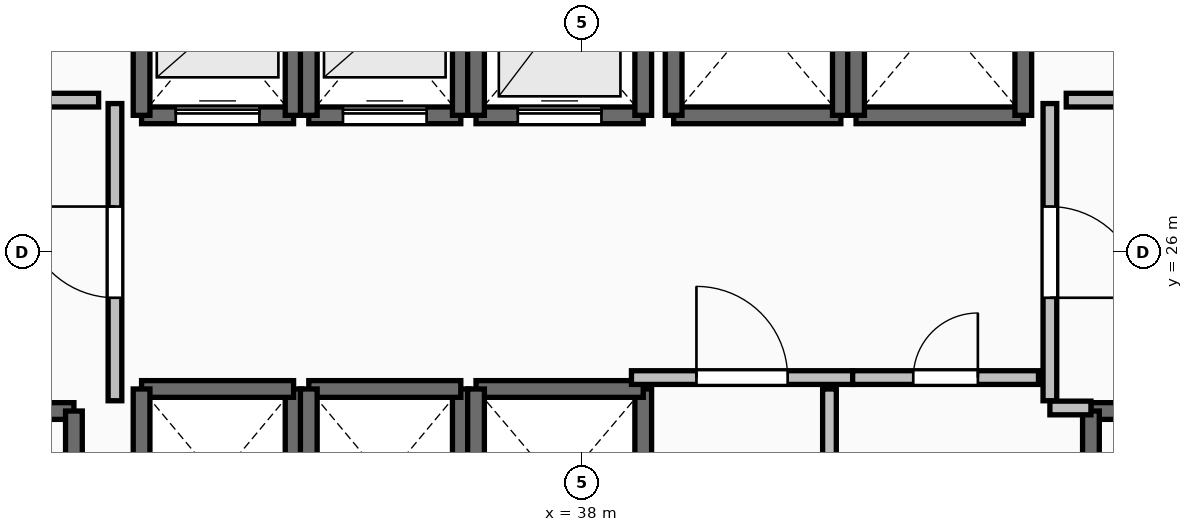
"""IFC4 building model, lengths in metres.
Left out: names, types, materials, properties, quantities, classifications, styles, units other than length and angle.
Written with IfcOpenShell. Run it as: python <this file> out.ifc"""

import sys

from ifc_helpers import new_model, si_unit, direction, frame, frame_2d, origin, place, context, subcontext, project, spatial, rectangle, extrude, element, fill, save


model = new_model("IFC4")
c1 = context("Model", 3, precision=1e-05, world=origin(), true_north=direction((0.0, 1.0)))
c2 = subcontext(c1, "Body", "Model", "MODEL_VIEW")
j1 = project(units=[si_unit("LENGTHUNIT", "METRE"), si_unit("PLANEANGLEUNIT", "RADIAN")], contexts=[c1])
p1 = place(None, origin())
s1 = spatial("IfcSite", under=j1, at=p1, CompositionType="ELEMENT")
p2 = place(p1, origin())
s2 = spatial("IfcBuilding", under=s1, at=p2, CompositionType="ELEMENT")
p3 = place(p2, frame((0.0, 0.0, 34.5)))
s3 = spatial("IfcBuildingStorey", under=s2, at=p3, CompositionType="ELEMENT", Elevation=34.5)
p4 = place(p3, frame((27.94, 23.91, 0.0), z_axis=(0.0, 0.0, 1.0), x_axis=(1.0, 0.0, 0.0)))
e1 = element("IfcWall", 1, at=p4, inside=s3, PredefinedType="SOLIDWALL", context=c2, shape_type="SweptSolid", body=[
    extrude(rectangle(XDim=3.37, YDim=0.22, at=frame_2d((1.685, 0.0))), origin(), (0.0, 0.0, 1.0), 3.24),
])
p5 = place(p4, frame((1.135, 0.0, 0.0)))
e2 = element("IfcOpeningElement", 2, at=p5, cuts=e1, PredefinedType="OPENING", context=c2, shape_type="SweptSolid", body=[
    extrude(rectangle(XDim=1.1, YDim=2.15, at=frame_2d((0.55, 1.075))), frame((0.0, 0.125, 0.0), z_axis=(0.0, -1.0, 0.0), x_axis=(1.0, 0.0, 0.0)), (0.0, 0.0, 1.0), 0.25),
])
p6 = place(p3, frame((31.31, 23.91, 0.0), z_axis=(0.0, 0.0, 1.0), x_axis=(0.0, -1.0, 0.0)))
e3 = element("IfcWall", 3, at=p6, inside=s3, PredefinedType="SOLIDWALL", context=c2, shape_type="SweptSolid", body=[
    extrude(rectangle(XDim=7.42, YDim=0.22, at=frame_2d((3.71, 0.0))), origin(), (0.0, 0.0, 1.0), 3.24),
])
p7 = place(p3, frame((44.69, 23.91, 0.0), z_axis=(0.0, 0.0, 1.0), x_axis=(1.0, 0.0, 0.0)))
e4 = element("IfcWall", 4, at=p7, inside=s3, PredefinedType="SOLIDWALL", context=c2, shape_type="SweptSolid", body=[
    extrude(rectangle(XDim=3.37, YDim=0.22, at=frame_2d((1.685, 0.0))), origin(), (0.0, 0.0, 1.0), 3.24),
])
p8 = place(p7, frame((1.135, 0.0, 0.0)))
e5 = element("IfcOpeningElement", 5, at=p8, cuts=e4, PredefinedType="OPENING", context=c2, shape_type="SweptSolid", body=[
    extrude(rectangle(XDim=1.1, YDim=2.15, at=frame_2d((0.55, 1.075))), frame((0.0, 0.125, 0.0), z_axis=(0.0, -1.0, 0.0), x_axis=(1.0, 0.0, 0.0)), (0.0, 0.0, 1.0), 0.25),
])
p9 = place(p3, frame((44.69, 16.49, 0.0), z_axis=(0.0, 0.0, 1.0), x_axis=(0.0, 1.0, 0.0)))
e6 = element("IfcWall", 6, at=p9, inside=s3, PredefinedType="SOLIDWALL", context=c2, shape_type="SweptSolid", body=[
    extrude(rectangle(XDim=7.42, YDim=0.22, at=frame_2d((3.71, 0.0))), origin(), (0.0, 0.0, 1.0), 3.24),
])
p10 = place(p3, frame((32.2, 27.8, 0.0), z_axis=(0.0, 0.0, 1.0), x_axis=(1.0, 0.0, 0.0)))
e7 = element("IfcWall", 7, at=p10, inside=s3, PredefinedType="SOLIDWALL", context=c2, shape_type="SweptSolid", body=[
    extrude(rectangle(XDim=2.0, YDim=0.22, at=frame_2d((1.0, 0.0))), origin(), (0.0, 0.0, 1.0), 3.24),
])
p11 = place(p10, frame((0.45, 0.0, 0.0)))
e8 = element("IfcOpeningElement", 8, at=p11, cuts=e7, PredefinedType="OPENING", context=c2, shape_type="SweptSolid", body=[
    extrude(rectangle(XDim=1.1, YDim=2.2, at=frame_2d((0.55, 1.1))), frame((0.0, 0.125, 0.0), z_axis=(0.0, -1.0, 0.0), x_axis=(1.0, 0.0, 0.0)), (0.0, 0.0, 1.0), 0.25),
])
for number, where, z_axis, x_axis in (
    (9, (34.2, 27.8, 0.0), (0.0, 0.0, 1.0), (0.0, 1.0, 0.0)),
    (10, (32.2, 30.2, 0.0), (0.0, 0.0, 1.0), (0.0, -1.0, 0.0)),
):
    element("IfcWall", number, at=place(p3, frame(where, z_axis=z_axis, x_axis=x_axis)), inside=s3, PredefinedType="SOLIDWALL", context=c2, shape_type="SweptSolid", body=[
        extrude(rectangle(XDim=2.4, YDim=0.22, at=frame_2d((1.2, 0.0))), origin(), (0.0, 0.0, 1.0), 3.24),
    ])
p12 = place(p3, frame((34.4, 27.8, 0.0), z_axis=(0.0, 0.0, 1.0), x_axis=(1.0, 0.0, 0.0)))
e11 = element("IfcWall", 11, at=p12, inside=s3, PredefinedType="SOLIDWALL", context=c2, shape_type="SweptSolid", body=[
    extrude(rectangle(XDim=2.0, YDim=0.22, at=frame_2d((1.0, 0.0))), origin(), (0.0, 0.0, 1.0), 3.24),
])
p13 = place(p12, frame((0.45, 0.0, 0.0)))
e12 = element("IfcOpeningElement", 12, at=p13, cuts=e11, PredefinedType="OPENING", context=c2, shape_type="SweptSolid", body=[
    extrude(rectangle(XDim=1.1, YDim=2.2, at=frame_2d((0.55, 1.1))), frame((0.0, 0.125, 0.0), z_axis=(0.0, -1.0, 0.0), x_axis=(1.0, 0.0, 0.0)), (0.0, 0.0, 1.0), 0.25),
])
for number, where, z_axis, x_axis in (
    (13, (36.4, 27.8, 0.0), (0.0, 0.0, 1.0), (0.0, 1.0, 0.0)),
    (14, (34.4, 30.2, 0.0), (0.0, 0.0, 1.0), (0.0, -1.0, 0.0)),
):
    element("IfcWall", number, at=place(p3, frame(where, z_axis=z_axis, x_axis=x_axis)), inside=s3, PredefinedType="SOLIDWALL", context=c2, shape_type="SweptSolid", body=[
        extrude(rectangle(XDim=2.4, YDim=0.22, at=frame_2d((1.2, 0.0))), origin(), (0.0, 0.0, 1.0), 3.24),
    ])
p14 = place(p3, frame((36.6, 27.8, 0.0), z_axis=(0.0, 0.0, 1.0), x_axis=(1.0, 0.0, 0.0)))
e15 = element("IfcWall", 15, at=p14, inside=s3, PredefinedType="SOLIDWALL", context=c2, shape_type="SweptSolid", body=[
    extrude(rectangle(XDim=2.2, YDim=0.22, at=frame_2d((1.1, 0.0))), origin(), (0.0, 0.0, 1.0), 3.24),
])
p15 = place(p14, frame((0.55, 0.0, 0.0)))
e16 = element("IfcOpeningElement", 16, at=p15, cuts=e15, PredefinedType="OPENING", context=c2, shape_type="SweptSolid", body=[
    extrude(rectangle(XDim=1.1, YDim=2.2, at=frame_2d((0.55, 1.1))), frame((0.0, 0.125, 0.0), z_axis=(0.0, -1.0, 0.0), x_axis=(1.0, 0.0, 0.0)), (0.0, 0.0, 1.0), 0.25),
])
for number, where, z_axis, x_axis in (
    (17, (38.8, 27.8, 0.0), (0.0, 0.0, 1.0), (0.0, 1.0, 0.0)),
    (18, (36.6, 30.4, 0.0), (0.0, 0.0, 1.0), (0.0, -1.0, 0.0)),
):
    element("IfcWall", number, at=place(p3, frame(where, z_axis=z_axis, x_axis=x_axis)), inside=s3, PredefinedType="SOLIDWALL", context=c2, shape_type="SweptSolid", body=[
        extrude(rectangle(XDim=2.6, YDim=0.22, at=frame_2d((1.3, 0.0))), origin(), (0.0, 0.0, 1.0), 3.24),
    ])
p16 = place(p3, frame((34.2, 21.8, 0.0), z_axis=(0.0, 0.0, 1.0), x_axis=(0.0, 1.0, 0.0)))
e19 = element("IfcWall", 19, at=p16, inside=s3, PredefinedType="SOLIDWALL", context=c2, shape_type="SweptSolid", body=[
    extrude(rectangle(XDim=2.4, YDim=0.22, at=frame_2d((1.2, 0.0))), origin(), (0.0, 0.0, 1.0), 3.24),
])
p17 = place(p3, frame((34.2, 24.2, 0.0), z_axis=(0.0, 0.0, 1.0), x_axis=(-1.0, 0.0, 0.0)))
e20 = element("IfcWall", 20, at=p17, inside=s3, PredefinedType="SOLIDWALL", context=c2, shape_type="SweptSolid", body=[
    extrude(rectangle(XDim=2.0, YDim=0.22, at=frame_2d((1.0, 0.0))), origin(), (0.0, 0.0, 1.0), 3.24),
])
for number, where, z_axis, x_axis in (
    (21, (32.2, 24.2, 0.0), (0.0, 0.0, 1.0), (0.0, -1.0, 0.0)),
    (22, (36.4, 21.8, 0.0), (0.0, 0.0, 1.0), (0.0, 1.0, 0.0)),
):
    element("IfcWall", number, at=place(p3, frame(where, z_axis=z_axis, x_axis=x_axis)), inside=s3, PredefinedType="SOLIDWALL", context=c2, shape_type="SweptSolid", body=[
        extrude(rectangle(XDim=2.4, YDim=0.22, at=frame_2d((1.2, 0.0))), origin(), (0.0, 0.0, 1.0), 3.24),
    ])
p18 = place(p3, frame((36.4, 24.2, 0.0), z_axis=(0.0, 0.0, 1.0), x_axis=(-1.0, 0.0, 0.0)))
e23 = element("IfcWall", 23, at=p18, inside=s3, PredefinedType="SOLIDWALL", context=c2, shape_type="SweptSolid", body=[
    extrude(rectangle(XDim=2.0, YDim=0.22, at=frame_2d((1.0, 0.0))), origin(), (0.0, 0.0, 1.0), 3.24),
])
p19 = place(p3, frame((34.4, 24.2, 0.0), z_axis=(0.0, 0.0, 1.0), x_axis=(0.0, -1.0, 0.0)))
e24 = element("IfcWall", 24, at=p19, inside=s3, PredefinedType="SOLIDWALL", context=c2, shape_type="SweptSolid", body=[
    extrude(rectangle(XDim=2.4, YDim=0.22, at=frame_2d((1.2, 0.0))), origin(), (0.0, 0.0, 1.0), 3.24),
])
p20 = place(p3, frame((38.8, 21.6, 0.0), z_axis=(0.0, 0.0, 1.0), x_axis=(0.0, 1.0, 0.0)))
e25 = element("IfcWall", 25, at=p20, inside=s3, PredefinedType="SOLIDWALL", context=c2, shape_type="SweptSolid", body=[
    extrude(rectangle(XDim=2.6, YDim=0.22, at=frame_2d((1.3, 0.0))), origin(), (0.0, 0.0, 1.0), 3.24),
])
p21 = place(p3, frame((38.8, 24.2, 0.0), z_axis=(0.0, 0.0, 1.0), x_axis=(-1.0, 0.0, 0.0)))
e26 = element("IfcWall", 26, at=p21, inside=s3, PredefinedType="SOLIDWALL", context=c2, shape_type="SweptSolid", body=[
    extrude(rectangle(XDim=2.2, YDim=0.22, at=frame_2d((1.1, 0.0))), origin(), (0.0, 0.0, 1.0), 3.24),
])
p22 = place(p3, frame((36.6, 24.2, 0.0), z_axis=(0.0, 0.0, 1.0), x_axis=(0.0, -1.0, 0.0)))
e27 = element("IfcWall", 27, at=p22, inside=s3, PredefinedType="SOLIDWALL", context=c2, shape_type="SweptSolid", body=[
    extrude(rectangle(XDim=2.6, YDim=0.22, at=frame_2d((1.3, 0.0))), origin(), (0.0, 0.0, 1.0), 3.24),
])
p23 = place(p3, frame((39.2, 27.8, 0.0), z_axis=(0.0, 0.0, 1.0), x_axis=(1.0, 0.0, 0.0)))
e28 = element("IfcWall", 28, at=p23, inside=s3, PredefinedType="SOLIDWALL", context=c2, shape_type="SweptSolid", body=[
    extrude(rectangle(XDim=2.2, YDim=0.22, at=frame_2d((1.1, 0.0))), origin(), (0.0, 0.0, 1.0), 3.24),
])
for number, where, z_axis, x_axis in (
    (29, (41.4, 27.8, 0.0), (0.0, 0.0, 1.0), (0.0, 1.0, 0.0)),
    (30, (39.2, 30.4, 0.0), (0.0, 0.0, 1.0), (0.0, -1.0, 0.0)),
):
    element("IfcWall", number, at=place(p3, frame(where, z_axis=z_axis, x_axis=x_axis)), inside=s3, PredefinedType="SOLIDWALL", context=c2, shape_type="SweptSolid", body=[
        extrude(rectangle(XDim=2.6, YDim=0.22, at=frame_2d((1.3, 0.0))), origin(), (0.0, 0.0, 1.0), 3.24),
    ])
p24 = place(p3, frame((41.6, 27.8, 0.0), z_axis=(0.0, 0.0, 1.0), x_axis=(1.0, 0.0, 0.0)))
e31 = element("IfcWall", 31, at=p24, inside=s3, PredefinedType="SOLIDWALL", context=c2, shape_type="SweptSolid", body=[
    extrude(rectangle(XDim=2.2, YDim=0.22, at=frame_2d((1.1, 0.0))), origin(), (0.0, 0.0, 1.0), 3.24),
])
for number, where, z_axis, x_axis in (
    (32, (43.8, 27.8, 0.0), (0.0, 0.0, 1.0), (0.0, 1.0, 0.0)),
    (33, (41.6, 30.4, 0.0), (0.0, 0.0, 1.0), (0.0, -1.0, 0.0)),
):
    element("IfcWall", number, at=place(p3, frame(where, z_axis=z_axis, x_axis=x_axis)), inside=s3, PredefinedType="SOLIDWALL", context=c2, shape_type="SweptSolid", body=[
        extrude(rectangle(XDim=2.6, YDim=0.22, at=frame_2d((1.3, 0.0))), origin(), (0.0, 0.0, 1.0), 3.24),
    ])
p25 = place(p3, frame((31.85, 24.045, 0.0), z_axis=(0.0, 0.0, 1.0), x_axis=(0.0, 1.0, 0.0)))
e34 = element("IfcWall", 34, at=p25, inside=s3, PredefinedType="PARTITIONING", context=c2, shape_type="SweptSolid", body=[
    extrude(rectangle(XDim=3.91, YDim=0.18, at=frame_2d((1.955, 0.0))), origin(), (0.0, 0.0, 1.0), 3.24),
])
p26 = place(p25, frame((1.355, 0.0, 0.0)))
e35 = element("IfcOpeningElement", 35, at=p26, cuts=e34, PredefinedType="OPENING", context=c2, shape_type="SweptSolid", body=[
    extrude(rectangle(XDim=1.2, YDim=2.15, at=frame_2d((0.6, 1.075))), frame((0.0, 0.105, 0.0), z_axis=(0.0, -1.0, 0.0), x_axis=(1.0, 0.0, 0.0)), (0.0, 0.0, 1.0), 0.21),
])
p27 = place(p3, frame((44.15, 27.955, 0.0), z_axis=(0.0, 0.0, 1.0), x_axis=(0.0, -1.0, 0.0)))
e36 = element("IfcWall", 36, at=p27, inside=s3, PredefinedType="PARTITIONING", context=c2, shape_type="SweptSolid", body=[
    extrude(rectangle(XDim=3.91, YDim=0.18, at=frame_2d((1.955, 0.0))), origin(), (0.0, 0.0, 1.0), 3.24),
])
p28 = place(p27, frame((1.355, 0.0, 0.0)))
e37 = element("IfcOpeningElement", 37, at=p28, cuts=e36, PredefinedType="OPENING", context=c2, shape_type="SweptSolid", body=[
    extrude(rectangle(XDim=1.2, YDim=2.15, at=frame_2d((0.6, 1.075))), frame((0.0, 0.105, 0.0), z_axis=(0.0, -1.0, 0.0), x_axis=(1.0, 0.0, 0.0)), (0.0, 0.0, 1.0), 0.21),
])
p29 = place(p3, frame((44.15, 23.95, 0.0), z_axis=(0.0, 0.0, 1.0), x_axis=(1.0, 0.0, 0.0)))
e38 = element("IfcWall", 38, at=p29, inside=s3, PredefinedType="PARTITIONING", context=c2, shape_type="SweptSolid", body=[
    extrude(rectangle(XDim=0.54, YDim=0.18, at=frame_2d((0.27, 0.0))), origin(), (0.0, 0.0, 1.0), 3.24),
])
p30 = place(p3, frame((38.645, 24.35, 0.0), z_axis=(0.0, 0.0, 1.0), x_axis=(1.0, 0.0, 0.0)))
e39 = element("IfcWall", 39, at=p30, inside=s3, PredefinedType="PARTITIONING", context=c2, shape_type="SweptSolid", body=[
    extrude(rectangle(XDim=2.91, YDim=0.18, at=frame_2d((1.455, 0.0))), origin(), (0.0, 0.0, 1.0), 3.24),
])
p31 = place(p30, frame((0.855, 0.0, 0.0)))
e40 = element("IfcOpeningElement", 40, at=p31, cuts=e39, PredefinedType="OPENING", context=c2, shape_type="SweptSolid", body=[
    extrude(rectangle(XDim=1.2, YDim=2.15, at=frame_2d((0.6, 1.075))), frame((0.0, 0.105, 0.0), z_axis=(0.0, -1.0, 0.0), x_axis=(1.0, 0.0, 0.0)), (0.0, 0.0, 1.0), 0.21),
])
p32 = place(p3, frame((41.555, 24.35, 0.0), z_axis=(0.0, 0.0, 1.0), x_axis=(1.0, 0.0, 0.0)))
e41 = element("IfcWall", 41, at=p32, inside=s3, PredefinedType="PARTITIONING", context=c2, shape_type="SweptSolid", body=[
    extrude(rectangle(XDim=2.445, YDim=0.18, at=frame_2d((1.223, 0.0))), origin(), (0.0, 0.0, 1.0), 3.24),
])
p33 = place(p32, frame((0.798, 0.0, 0.0)))
e42 = element("IfcOpeningElement", 42, at=p33, cuts=e41, PredefinedType="OPENING", context=c2, shape_type="SweptSolid", body=[
    extrude(rectangle(XDim=0.85, YDim=2.1, at=frame_2d((0.425, 1.05))), frame((0.0, 0.105, 0.0), z_axis=(0.0, -1.0, 0.0), x_axis=(1.0, 0.0, 0.0)), (0.0, 0.0, 1.0), 0.21),
])
p34 = place(p3, frame((41.25, 20.305, 0.0), z_axis=(0.0, 0.0, 1.0), x_axis=(0.0, 1.0, 0.0)))
e43 = element("IfcWall", 43, at=p34, inside=s3, PredefinedType="PARTITIONING", context=c2, shape_type="SweptSolid", body=[
    extrude(rectangle(XDim=3.895, YDim=0.18, at=frame_2d((1.948, 0.0))), origin(), (0.0, 0.0, 1.0), 3.24),
])
p35 = place(p34, frame((1.522, 0.0, 0.0)))
e44 = element("IfcOpeningElement", 44, at=p35, cuts=e43, PredefinedType="OPENING", context=c2, shape_type="SweptSolid", body=[
    extrude(rectangle(XDim=0.85, YDim=2.1, at=frame_2d((0.425, 1.05))), frame((0.0, 0.105, 0.0), z_axis=(0.0, -1.0, 0.0), x_axis=(1.0, 0.0, 0.0)), (0.0, 0.0, 1.0), 0.21),
])
for number, where, z_axis, x_axis in (
    (45, (31.635, 28.0, 0.0), (0.0, 0.0, 1.0), (-1.0, 0.0, 0.0)),
    (46, (45.28, 28.0, 0.0), (0.0, 0.0, 1.0), (-1.0, 0.0, 0.0)),
):
    element("IfcWall", number, at=place(p3, frame(where, z_axis=z_axis, x_axis=x_axis)), inside=s3, PredefinedType="PARTITIONING", context=c2, shape_type="SweptSolid", body=[
        extrude(rectangle(XDim=0.915, YDim=0.18, at=frame_2d((0.458, 0.0))), origin(), (0.0, 0.0, 1.0), 3.24),
    ])
p36 = place(p11, origin())
e47 = element("IfcDoor", 47, at=p36, inside=s3, OperationType="SLIDING_TO_LEFT", PredefinedType="DOOR", context=c2, shape_type="SweptSolid", body=[
    extrude(rectangle(XDim=1.1, YDim=2.2, at=frame_2d((0.55, 1.1))), frame((0.0, 0.025, 0.0), z_axis=(0.0, -1.0, 0.0), x_axis=(1.0, 0.0, 0.0)), (0.0, 0.0, 1.0), 0.05),
])
fill(e8, e47)
p37 = place(p13, origin())
e48 = element("IfcDoor", 48, at=p37, inside=s3, OperationType="SLIDING_TO_LEFT", PredefinedType="DOOR", context=c2, shape_type="SweptSolid", body=[
    extrude(rectangle(XDim=1.1, YDim=2.2, at=frame_2d((0.55, 1.1))), frame((0.0, 0.025, 0.0), z_axis=(0.0, -1.0, 0.0), x_axis=(1.0, 0.0, 0.0)), (0.0, 0.0, 1.0), 0.05),
])
fill(e12, e48)
p38 = place(p15, origin())
e49 = element("IfcDoor", 49, at=p38, inside=s3, OperationType="SLIDING_TO_LEFT", PredefinedType="DOOR", context=c2, shape_type="SweptSolid", body=[
    extrude(rectangle(XDim=1.1, YDim=2.2, at=frame_2d((0.55, 1.1))), frame((0.0, 0.025, 0.0), z_axis=(0.0, -1.0, 0.0), x_axis=(1.0, 0.0, 0.0)), (0.0, 0.0, 1.0), 0.05),
])
fill(e16, e49)
p39 = place(p26, origin())
e50 = element("IfcDoor", 50, at=p39, inside=s3, OperationType="SINGLE_SWING_RIGHT", PredefinedType="DOOR", context=c2, shape_type="SweptSolid", body=[
    extrude(rectangle(XDim=1.2, YDim=2.15, at=frame_2d((0.6, 1.075))), frame((0.0, 0.025, 0.0), z_axis=(0.0, -1.0, 0.0), x_axis=(1.0, 0.0, 0.0)), (0.0, 0.0, 1.0), 0.05),
])
fill(e35, e50)
p40 = place(p28, origin())
e51 = element("IfcDoor", 51, at=p40, inside=s3, OperationType="SINGLE_SWING_RIGHT", PredefinedType="DOOR", context=c2, shape_type="SweptSolid", body=[
    extrude(rectangle(XDim=1.2, YDim=2.15, at=frame_2d((0.6, 1.075))), frame((0.0, 0.025, 0.0), z_axis=(0.0, -1.0, 0.0), x_axis=(1.0, 0.0, 0.0)), (0.0, 0.0, 1.0), 0.05),
])
fill(e37, e51)
p41 = place(p31, origin())
e52 = element("IfcDoor", 52, at=p41, inside=s3, OperationType="SINGLE_SWING_LEFT", PredefinedType="DOOR", context=c2, shape_type="SweptSolid", body=[
    extrude(rectangle(XDim=1.2, YDim=2.15, at=frame_2d((0.6, 1.075))), frame((0.0, 0.025, 0.0), z_axis=(0.0, -1.0, 0.0), x_axis=(1.0, 0.0, 0.0)), (0.0, 0.0, 1.0), 0.05),
])
fill(e40, e52)
p42 = place(p33, origin())
e53 = element("IfcDoor", 53, at=p42, inside=s3, OperationType="SINGLE_SWING_RIGHT", PredefinedType="DOOR", context=c2, shape_type="SweptSolid", body=[
    extrude(rectangle(XDim=0.85, YDim=2.1, at=frame_2d((0.425, 1.05))), frame((0.0, 0.025, 0.0), z_axis=(0.0, -1.0, 0.0), x_axis=(1.0, 0.0, 0.0)), (0.0, 0.0, 1.0), 0.05),
])
fill(e42, e53)
save(model, sys.argv[1])
